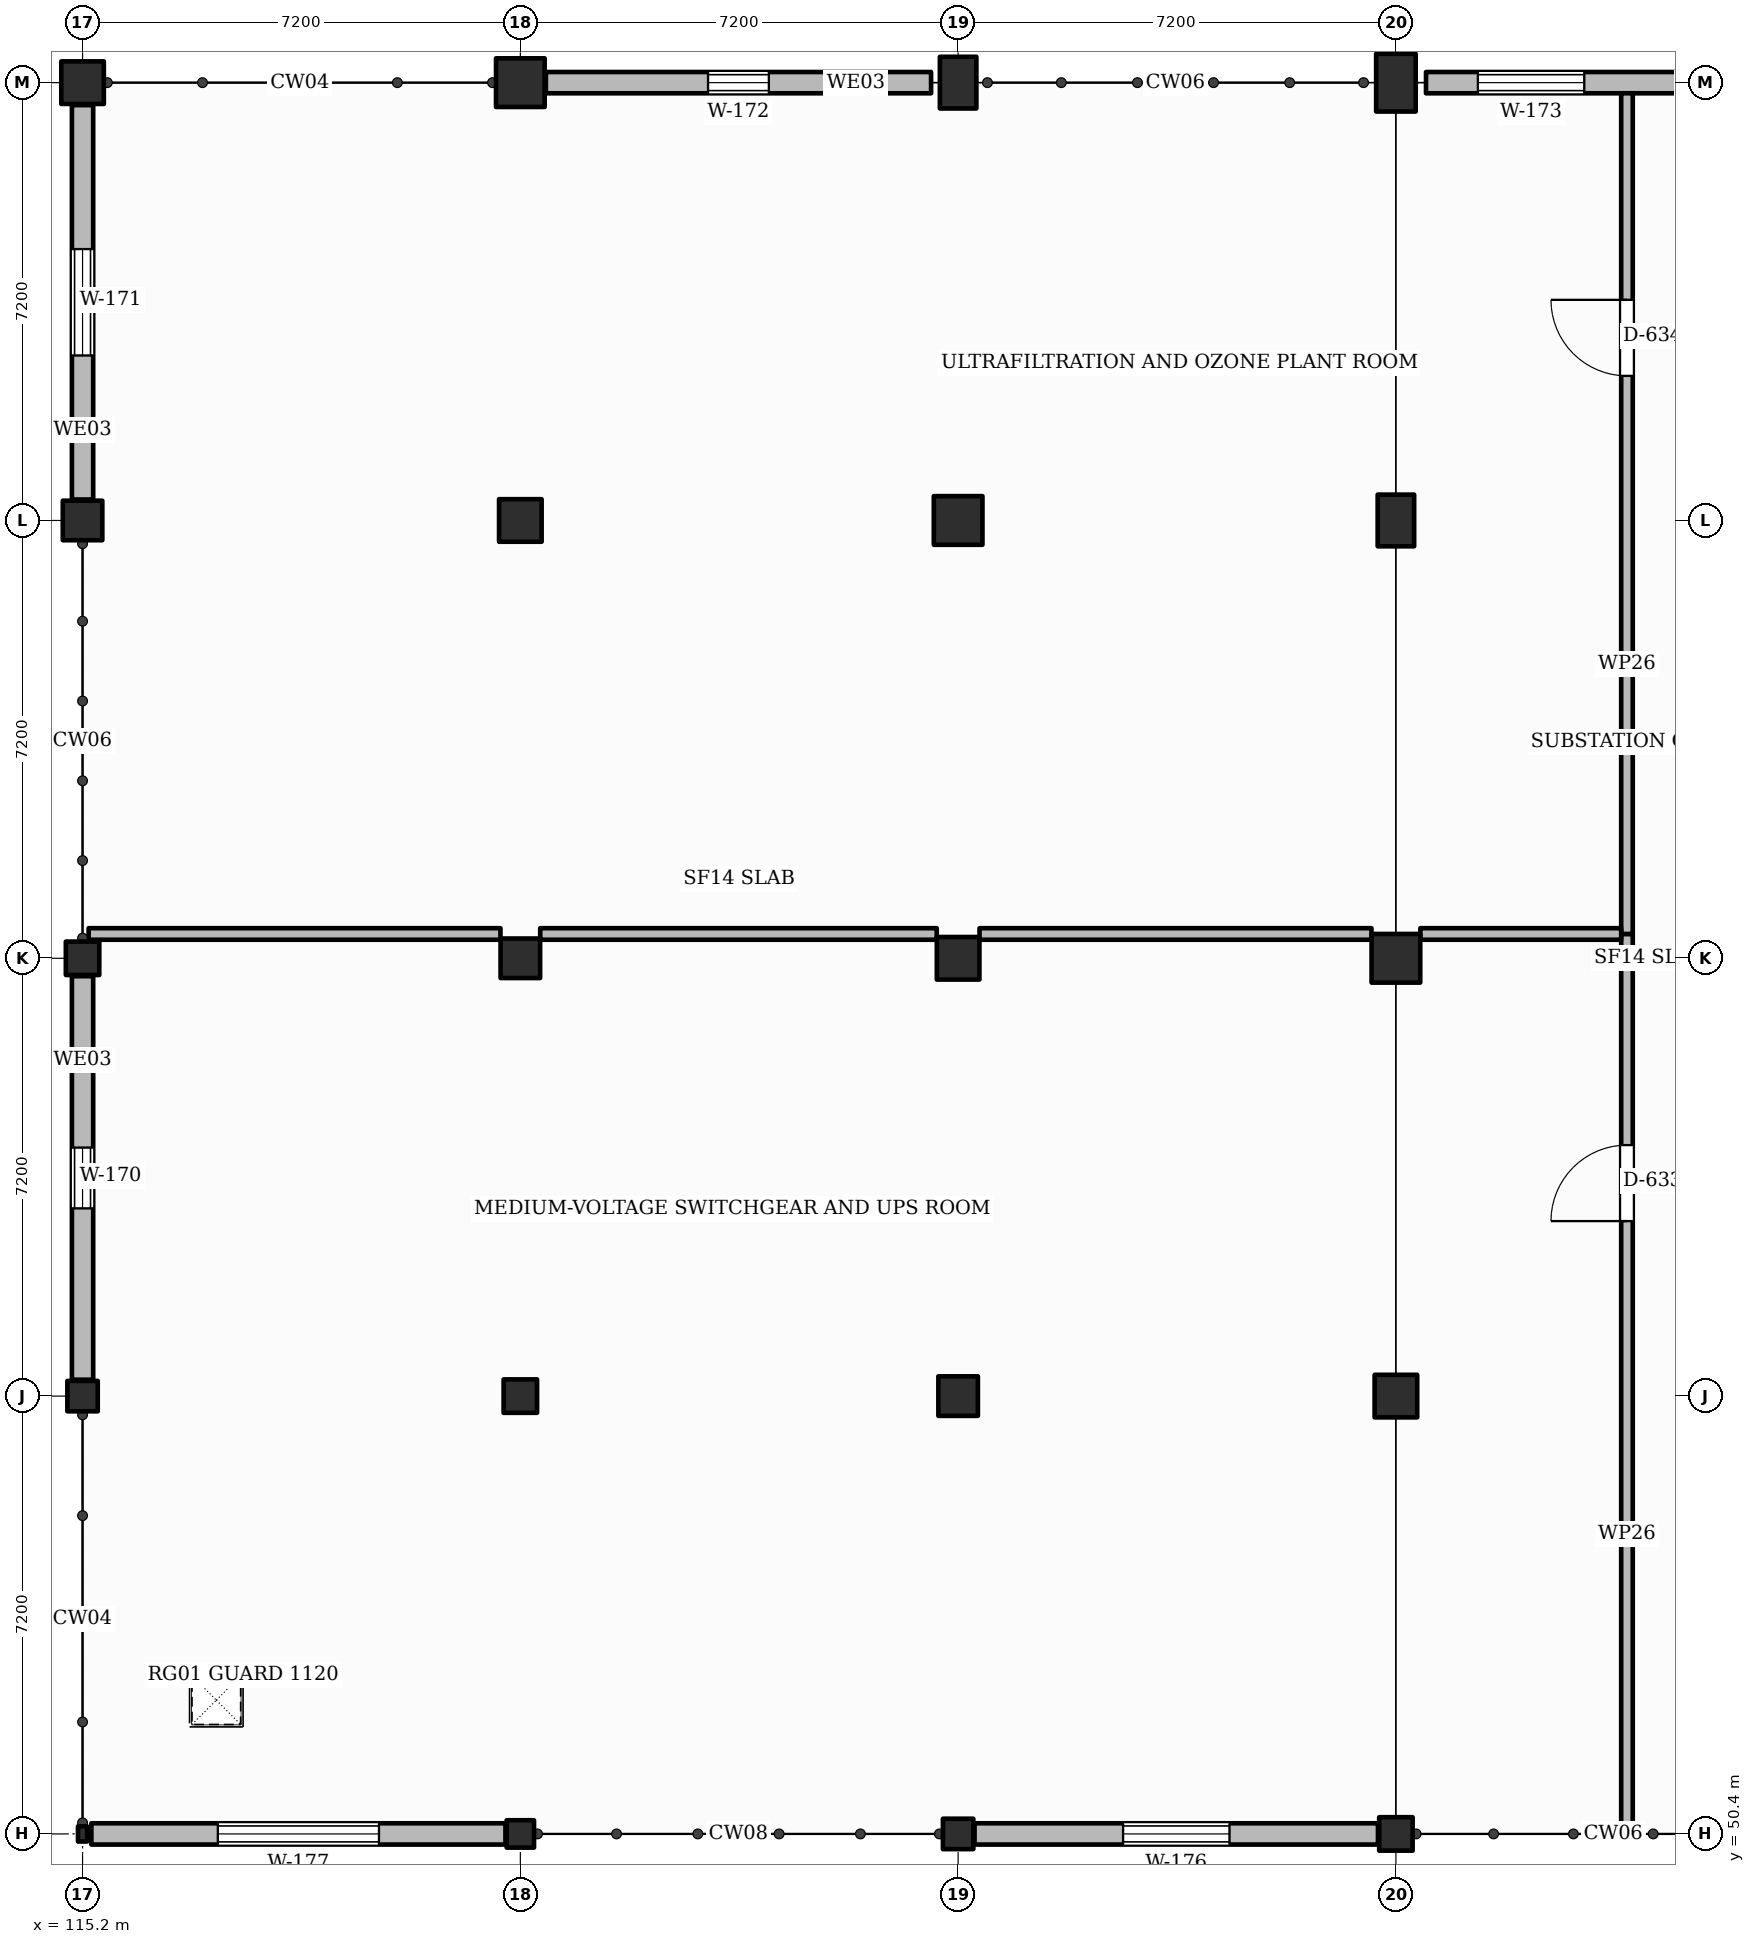
"""IFC4 building model, lengths in metres.
Left out: names, types, materials, properties, quantities, classifications, styles, units other than length and angle.
Written with IfcOpenShell. Run it as: python <this file> out.ifc"""

import sys

from ifc_helpers import new_model, si_unit, direction, frame, frame_2d, origin, origin_2d, place, context, subcontext, project, spatial, rectangle, hollow_rectangle, extrude, element, fill, save


model = new_model("IFC4")
c1 = context("Model", 3, precision=1e-05, world=origin(), true_north=direction((0.0, 1.0)))
c2 = subcontext(c1, "Body", "Model", "MODEL_VIEW")
j1 = project(units=[si_unit("LENGTHUNIT", "METRE"), si_unit("PLANEANGLEUNIT", "RADIAN")], contexts=[c1])
p1 = place(None, origin())
s1 = spatial("IfcSite", under=j1, at=p1, CompositionType="ELEMENT")
p2 = place(p1, origin())
s2 = spatial("IfcBuilding", under=s1, at=p2, CompositionType="ELEMENT")
p3 = place(p2, frame((0.0, 0.0, 5.4)))
s3 = spatial("IfcBuildingStorey", under=s2, at=p3, CompositionType="ELEMENT", Elevation=5.4)
p4 = place(p3, frame((115.2, 50.4, 0.0), z_axis=(0.0, 0.0, 1.0), x_axis=(1.0, 0.0, 0.0)))
e1 = element("IfcColumn", 1, at=p4, inside=s3, PredefinedType="COLUMN", context=c2, shape_type="SweptSolid", body=[
    extrude(hollow_rectangle(XDim=0.15, YDim=0.25, WallThickness=0.01, InnerFilletRadius=0.005, OuterFilletRadius=0.015, at=origin_2d()), origin(), (0.0, 0.0, 1.0), 4.5),
])
p5 = place(p3, frame((115.2, 57.6, 0.0), z_axis=(0.0, 0.0, 1.0), x_axis=(1.0, 0.0, 0.0)))
e2 = element("IfcColumn", 2, at=p5, inside=s3, PredefinedType="COLUMN", context=c2, shape_type="SweptSolid", body=[
    extrude(rectangle(XDim=0.5, YDim=0.5, at=origin_2d()), origin(), (0.0, 0.0, 1.0), 4.5),
])
p6 = place(p3, frame((115.2, 64.8, 0.0), z_axis=(0.0, 0.0, 1.0), x_axis=(1.0, 0.0, 0.0)))
e3 = element("IfcColumn", 3, at=p6, inside=s3, PredefinedType="COLUMN", context=c2, shape_type="SweptSolid", body=[
    extrude(rectangle(XDim=0.55, YDim=0.55, at=origin_2d()), origin(), (0.0, 0.0, 1.0), 4.5),
])
p7 = place(p3, frame((115.2, 72.0, 0.0), z_axis=(0.0, 0.0, 1.0), x_axis=(1.0, 0.0, 0.0)))
e4 = element("IfcColumn", 4, at=p7, inside=s3, PredefinedType="COLUMN", context=c2, shape_type="SweptSolid", body=[
    extrude(rectangle(XDim=0.65, YDim=0.65, at=origin_2d()), origin(), (0.0, 0.0, 1.0), 4.5),
])
p8 = place(p3, frame((115.2, 79.2, 0.0), z_axis=(0.0, 0.0, 1.0), x_axis=(1.0, 0.0, 0.0)))
e5 = element("IfcColumn", 5, at=p8, inside=s3, PredefinedType="COLUMN", context=c2, shape_type="SweptSolid", body=[
    extrude(rectangle(XDim=0.7, YDim=0.7, at=origin_2d()), origin(), (0.0, 0.0, 1.0), 4.5),
])
p9 = place(p3, frame((122.4, 50.4, 0.0), z_axis=(0.0, 0.0, 1.0), x_axis=(1.0, 0.0, 0.0)))
e6 = element("IfcColumn", 6, at=p9, inside=s3, PredefinedType="COLUMN", context=c2, shape_type="SweptSolid", body=[
    extrude(rectangle(XDim=0.45, YDim=0.45, at=origin_2d()), origin(), (0.0, 0.0, 1.0), 4.5),
])
p10 = place(p3, frame((122.4, 57.6, 0.0), z_axis=(0.0, 0.0, 1.0), x_axis=(1.0, 0.0, 0.0)))
e7 = element("IfcColumn", 7, at=p10, inside=s3, PredefinedType="COLUMN", context=c2, shape_type="SweptSolid", body=[
    extrude(rectangle(XDim=0.55, YDim=0.55, at=origin_2d()), origin(), (0.0, 0.0, 1.0), 4.5),
])
p11 = place(p3, frame((122.4, 64.8, 0.0), z_axis=(0.0, 0.0, 1.0), x_axis=(1.0, 0.0, 0.0)))
e8 = element("IfcColumn", 8, at=p11, inside=s3, PredefinedType="COLUMN", context=c2, shape_type="SweptSolid", body=[
    extrude(rectangle(XDim=0.65, YDim=0.65, at=origin_2d()), origin(), (0.0, 0.0, 1.0), 4.5),
])
p12 = place(p3, frame((122.4, 72.0, 0.0), z_axis=(0.0, 0.0, 1.0), x_axis=(1.0, 0.0, 0.0)))
e9 = element("IfcColumn", 9, at=p12, inside=s3, PredefinedType="COLUMN", context=c2, shape_type="SweptSolid", body=[
    extrude(rectangle(XDim=0.7, YDim=0.7, at=origin_2d()), origin(), (0.0, 0.0, 1.0), 4.5),
])
p13 = place(p3, frame((122.4, 79.2, 0.0), z_axis=(0.0, 0.0, 1.0), x_axis=(1.0, 0.0, 0.0)))
e10 = element("IfcColumn", 10, at=p13, inside=s3, PredefinedType="COLUMN", context=c2, shape_type="SweptSolid", body=[
    extrude(rectangle(XDim=0.8, YDim=0.8, at=origin_2d()), origin(), (0.0, 0.0, 1.0), 4.5),
])
p14 = place(p3, frame((129.6, 50.4, 0.0), z_axis=(0.0, 0.0, 1.0), x_axis=(1.0, 0.0, 0.0)))
e11 = element("IfcColumn", 11, at=p14, inside=s3, PredefinedType="COLUMN", context=c2, shape_type="SweptSolid", body=[
    extrude(rectangle(XDim=0.5, YDim=0.5, at=origin_2d()), origin(), (0.0, 0.0, 1.0), 4.5),
])
p15 = place(p3, frame((129.6, 57.6, 0.0), z_axis=(0.0, 0.0, 1.0), x_axis=(1.0, 0.0, 0.0)))
e12 = element("IfcColumn", 12, at=p15, inside=s3, PredefinedType="COLUMN", context=c2, shape_type="SweptSolid", body=[
    extrude(rectangle(XDim=0.65, YDim=0.65, at=origin_2d()), origin(), (0.0, 0.0, 1.0), 4.5),
])
p16 = place(p3, frame((129.6, 64.8, 0.0), z_axis=(0.0, 0.0, 1.0), x_axis=(1.0, 0.0, 0.0)))
e13 = element("IfcColumn", 13, at=p16, inside=s3, PredefinedType="COLUMN", context=c2, shape_type="SweptSolid", body=[
    extrude(rectangle(XDim=0.7, YDim=0.7, at=origin_2d()), origin(), (0.0, 0.0, 1.0), 4.5),
])
p17 = place(p3, frame((129.6, 72.0, 0.0), z_axis=(0.0, 0.0, 1.0), x_axis=(1.0, 0.0, 0.0)))
e14 = element("IfcColumn", 14, at=p17, inside=s3, PredefinedType="COLUMN", context=c2, shape_type="SweptSolid", body=[
    extrude(rectangle(XDim=0.8, YDim=0.8, at=origin_2d()), origin(), (0.0, 0.0, 1.0), 4.5),
])
p18 = place(p3, frame((129.6, 79.2, 0.0), z_axis=(0.0, 0.0, 1.0), x_axis=(1.0, 0.0, 0.0)))
e15 = element("IfcColumn", 15, at=p18, inside=s3, PredefinedType="COLUMN", context=c2, shape_type="SweptSolid", body=[
    extrude(rectangle(XDim=0.6, YDim=0.85, at=origin_2d()), origin(), (0.0, 0.0, 1.0), 4.5),
])
p19 = place(p3, frame((136.8, 50.4, 0.0), z_axis=(0.0, 0.0, 1.0), x_axis=(1.0, 0.0, 0.0)))
e16 = element("IfcColumn", 16, at=p19, inside=s3, PredefinedType="COLUMN", context=c2, shape_type="SweptSolid", body=[
    extrude(rectangle(XDim=0.55, YDim=0.55, at=origin_2d()), origin(), (0.0, 0.0, 1.0), 4.5),
])
p20 = place(p3, frame((136.8, 57.6, 0.0), z_axis=(0.0, 0.0, 1.0), x_axis=(1.0, 0.0, 0.0)))
e17 = element("IfcColumn", 17, at=p20, inside=s3, PredefinedType="COLUMN", context=c2, shape_type="SweptSolid", body=[
    extrude(rectangle(XDim=0.7, YDim=0.7, at=origin_2d()), origin(), (0.0, 0.0, 1.0), 4.5),
])
p21 = place(p3, frame((136.8, 64.8, 0.0), z_axis=(0.0, 0.0, 1.0), x_axis=(1.0, 0.0, 0.0)))
e18 = element("IfcColumn", 18, at=p21, inside=s3, PredefinedType="COLUMN", context=c2, shape_type="SweptSolid", body=[
    extrude(rectangle(XDim=0.8, YDim=0.8, at=origin_2d()), origin(), (0.0, 0.0, 1.0), 4.5),
])
p22 = place(p3, frame((136.8, 72.0, 0.0), z_axis=(0.0, 0.0, 1.0), x_axis=(1.0, 0.0, 0.0)))
e19 = element("IfcColumn", 19, at=p22, inside=s3, PredefinedType="COLUMN", context=c2, shape_type="SweptSolid", body=[
    extrude(rectangle(XDim=0.6, YDim=0.85, at=origin_2d()), origin(), (0.0, 0.0, 1.0), 4.5),
])
p23 = place(p3, frame((136.8, 79.2, 0.0), z_axis=(0.0, 0.0, 1.0), x_axis=(1.0, 0.0, 0.0)))
e20 = element("IfcColumn", 20, at=p23, inside=s3, PredefinedType="COLUMN", context=c2, shape_type="SweptSolid", body=[
    extrude(rectangle(XDim=0.65, YDim=0.95, at=origin_2d()), origin(), (0.0, 0.0, 1.0), 4.5),
])
p24 = place(p3, frame((115.2, 57.87, 0.0), z_axis=(0.0, 0.0, 1.0), x_axis=(0.0, 1.0, 0.0)))
e21 = element("IfcWall", 21, at=p24, inside=s3, PredefinedType="SOLIDWALL", context=c2, shape_type="SweptSolid", body=[
    extrude(rectangle(XDim=6.635, YDim=0.35, at=frame_2d((3.317, 0.0))), origin(), (0.0, 0.0, 1.0), 3.684),
])
p25 = place(p24, frame((2.817, 0.0, 1.05)))
e22 = element("IfcOpeningElement", 22, at=p25, cuts=e21, PredefinedType="OPENING", context=c2, shape_type="SweptSolid", body=[
    extrude(rectangle(XDim=1.0, YDim=1.6, at=frame_2d((0.5, 0.8))), frame((0.0, 0.185, 0.0), z_axis=(0.0, -1.0, 0.0), x_axis=(1.0, 0.0, 0.0)), (0.0, 0.0, 1.0), 0.37),
])
p26 = place(p3, frame((115.2, 72.345, 0.0), z_axis=(0.0, 0.0, 1.0), x_axis=(0.0, 1.0, 0.0)))
e23 = element("IfcWall", 23, at=p26, inside=s3, PredefinedType="SOLIDWALL", context=c2, shape_type="SweptSolid", body=[
    extrude(rectangle(XDim=6.485, YDim=0.35, at=frame_2d((3.243, 0.0))), origin(), (0.0, 0.0, 1.0), 3.75),
])
p27 = place(p26, frame((2.368, 0.0, 1.05)))
e24 = element("IfcOpeningElement", 24, at=p27, cuts=e23, PredefinedType="OPENING", context=c2, shape_type="SweptSolid", body=[
    extrude(rectangle(XDim=1.75, YDim=1.85, at=frame_2d((0.875, 0.925))), frame((0.0, 0.185, 0.0), z_axis=(0.0, -1.0, 0.0), x_axis=(1.0, 0.0, 0.0)), (0.0, 0.0, 1.0), 0.37),
])
p28 = place(p3, frame((122.82, 79.2, 0.0), z_axis=(0.0, 0.0, 1.0), x_axis=(1.0, 0.0, 0.0)))
e25 = element("IfcWall", 25, at=p28, inside=s3, PredefinedType="SOLIDWALL", context=c2, shape_type="SweptSolid", body=[
    extrude(rectangle(XDim=6.335, YDim=0.35, at=frame_2d((3.167, 0.0))), origin(), (0.0, 0.0, 1.0), 3.75),
])
p29 = place(p28, frame((2.667, 0.0, 1.05)))
e26 = element("IfcOpeningElement", 26, at=p29, cuts=e25, PredefinedType="OPENING", context=c2, shape_type="SweptSolid", body=[
    extrude(rectangle(XDim=1.0, YDim=1.6, at=frame_2d((0.5, 0.8))), frame((0.0, 0.185, 0.0), z_axis=(0.0, -1.0, 0.0), x_axis=(1.0, 0.0, 0.0)), (0.0, 0.0, 1.0), 0.37),
])
p30 = place(p3, frame((137.295, 79.2, 0.0), z_axis=(0.0, 0.0, 1.0), x_axis=(1.0, 0.0, 0.0)))
e27 = element("IfcWall", 27, at=p30, inside=s3, PredefinedType="SOLIDWALL", context=c2, shape_type="SweptSolid", body=[
    extrude(rectangle(XDim=6.547, YDim=0.35, at=frame_2d((3.273, 0.0))), origin(), (0.0, 0.0, 1.0), 3.75),
])
p31 = place(p30, frame((0.853, 0.0, 1.05)))
e28 = element("IfcOpeningElement", 28, at=p31, cuts=e27, PredefinedType="OPENING", context=c2, shape_type="SweptSolid", body=[
    extrude(rectangle(XDim=1.75, YDim=1.85, at=frame_2d((0.875, 0.925))), frame((0.0, 0.185, 0.0), z_axis=(0.0, -1.0, 0.0), x_axis=(1.0, 0.0, 0.0)), (0.0, 0.0, 1.0), 0.37),
])
p32 = place(p3, frame((136.505, 50.4, 0.0), z_axis=(0.0, 0.0, 1.0), x_axis=(-1.0, 0.0, 0.0)))
e29 = element("IfcWall", 29, at=p32, inside=s3, PredefinedType="SOLIDWALL", context=c2, shape_type="SweptSolid", body=[
    extrude(rectangle(XDim=6.635, YDim=0.35, at=frame_2d((3.317, 0.0))), origin(), (0.0, 0.0, 1.0), 3.37),
])
p33 = place(p32, frame((2.442, 0.0, 1.05)))
e30 = element("IfcOpeningElement", 30, at=p33, cuts=e29, PredefinedType="OPENING", context=c2, shape_type="SweptSolid", body=[
    extrude(rectangle(XDim=1.75, YDim=1.85, at=frame_2d((0.875, 0.925))), frame((0.0, 0.185, 0.0), z_axis=(0.0, -1.0, 0.0), x_axis=(1.0, 0.0, 0.0)), (0.0, 0.0, 1.0), 0.37),
])
p34 = place(p3, frame((122.155, 50.4, 0.0), z_axis=(0.0, 0.0, 1.0), x_axis=(-1.0, 0.0, 0.0)))
e31 = element("IfcWall", 31, at=p34, inside=s3, PredefinedType="SOLIDWALL", context=c2, shape_type="SweptSolid", body=[
    extrude(rectangle(XDim=6.81, YDim=0.35, at=frame_2d((3.405, 0.0))), origin(), (0.0, 0.0, 1.0), 3.37),
])
p35 = place(p34, frame((2.08, 0.0, 1.05)))
e32 = element("IfcOpeningElement", 32, at=p35, cuts=e31, PredefinedType="OPENING", context=c2, shape_type="SweptSolid", body=[
    extrude(rectangle(XDim=2.65, YDim=1.6, at=frame_2d((1.325, 0.8))), frame((0.0, 0.185, 0.0), z_axis=(0.0, -1.0, 0.0), x_axis=(1.0, 0.0, 0.0)), (0.0, 0.0, 1.0), 0.37),
])
p36 = place(p3, frame((140.6, 50.5, 0.0), z_axis=(0.0, 0.0, 1.0), x_axis=(0.0, 1.0, 0.0)))
e33 = element("IfcWall", 33, at=p36, inside=s3, PredefinedType="PARTITIONING", context=c2, shape_type="SweptSolid", body=[
    extrude(rectangle(XDim=14.7, YDim=0.19, at=frame_2d((7.35, 0.0))), origin(), (0.0, 0.0, 1.0), 3.55),
])
p37 = place(p36, frame((9.978, 0.0, 0.0)))
e34 = element("IfcOpeningElement", 34, at=p37, cuts=e33, PredefinedType="OPENING", context=c2, shape_type="SweptSolid", body=[
    extrude(rectangle(XDim=1.25, YDim=2.15, at=frame_2d((0.625, 1.075))), frame((0.0, 0.105, 0.0), z_axis=(0.0, -1.0, 0.0), x_axis=(1.0, 0.0, 0.0)), (0.0, 0.0, 1.0), 0.21),
])
p38 = place(p3, frame((140.6, 65.2, 0.0), z_axis=(0.0, 0.0, 1.0), x_axis=(0.0, 1.0, 0.0)))
e35 = element("IfcWall", 35, at=p38, inside=s3, PredefinedType="PARTITIONING", context=c2, shape_type="SweptSolid", body=[
    extrude(rectangle(XDim=13.825, YDim=0.19, at=frame_2d((6.913, 0.0))), origin(), (0.0, 0.0, 1.0), 3.55),
])
p39 = place(p38, frame((9.178, 0.0, 0.0)))
e36 = element("IfcOpeningElement", 36, at=p39, cuts=e35, PredefinedType="OPENING", context=c2, shape_type="SweptSolid", body=[
    extrude(rectangle(XDim=1.25, YDim=2.15, at=frame_2d((0.625, 1.075))), frame((0.0, 0.105, 0.0), z_axis=(0.0, -1.0, 0.0), x_axis=(1.0, 0.0, 0.0)), (0.0, 0.0, 1.0), 0.21),
])
p40 = place(p3, frame((115.3, 65.2, 0.0), z_axis=(0.0, 0.0, 1.0), x_axis=(1.0, 0.0, 0.0)))
e37 = element("IfcWall", 37, at=p40, inside=s3, PredefinedType="PARTITIONING", context=c2, shape_type="SweptSolid", body=[
    extrude(rectangle(XDim=6.773, YDim=0.19, at=frame_2d((3.386, 0.0))), origin(), (0.0, 0.0, 1.0), 3.55),
])
p41 = place(p3, frame((122.727, 65.2, 0.0), z_axis=(0.0, 0.0, 1.0), x_axis=(1.0, 0.0, 0.0)))
e38 = element("IfcWall", 38, at=p41, inside=s3, PredefinedType="PARTITIONING", context=c2, shape_type="SweptSolid", body=[
    extrude(rectangle(XDim=6.521, YDim=0.19, at=frame_2d((3.26, 0.0))), origin(), (0.0, 0.0, 1.0), 3.55),
])
p42 = place(p3, frame((129.952, 65.2, 0.0), z_axis=(0.0, 0.0, 1.0), x_axis=(1.0, 0.0, 0.0)))
e39 = element("IfcWall", 39, at=p42, inside=s3, PredefinedType="PARTITIONING", context=c2, shape_type="SweptSolid", body=[
    extrude(rectangle(XDim=6.446, YDim=0.19, at=frame_2d((3.223, 0.0))), origin(), (0.0, 0.0, 1.0), 3.55),
])
p43 = place(p3, frame((137.202, 65.2, 0.0), z_axis=(0.0, 0.0, 1.0), x_axis=(1.0, 0.0, 0.0)))
e40 = element("IfcWall", 40, at=p43, inside=s3, PredefinedType="PARTITIONING", context=c2, shape_type="SweptSolid", body=[
    extrude(rectangle(XDim=3.303, YDim=0.19, at=frame_2d((1.651, 0.0))), origin(), (0.0, 0.0, 1.0), 3.55),
])
p44 = place(p25, origin())
e41 = element("IfcWindow", 41, at=p44, inside=s3, PartitioningType="SINGLE_PANEL", PredefinedType="WINDOW", context=c2, shape_type="SweptSolid", body=[
    extrude(rectangle(XDim=1.0, YDim=1.6, at=frame_2d((0.5, 0.8))), frame((0.0, 0.03, 0.0), z_axis=(0.0, -1.0, 0.0), x_axis=(1.0, 0.0, 0.0)), (0.0, 0.0, 1.0), 0.06),
])
fill(e22, e41)
p45 = place(p27, origin())
e42 = element("IfcWindow", 42, at=p45, inside=s3, PartitioningType="SINGLE_PANEL", PredefinedType="WINDOW", context=c2, shape_type="SweptSolid", body=[
    extrude(rectangle(XDim=1.75, YDim=1.85, at=frame_2d((0.875, 0.925))), frame((0.0, 0.03, 0.0), z_axis=(0.0, -1.0, 0.0), x_axis=(1.0, 0.0, 0.0)), (0.0, 0.0, 1.0), 0.06),
])
fill(e24, e42)
p46 = place(p29, origin())
e43 = element("IfcWindow", 43, at=p46, inside=s3, PartitioningType="SINGLE_PANEL", PredefinedType="WINDOW", context=c2, shape_type="SweptSolid", body=[
    extrude(rectangle(XDim=1.0, YDim=1.6, at=frame_2d((0.5, 0.8))), frame((0.0, 0.03, 0.0), z_axis=(0.0, -1.0, 0.0), x_axis=(1.0, 0.0, 0.0)), (0.0, 0.0, 1.0), 0.06),
])
fill(e26, e43)
p47 = place(p31, origin())
e44 = element("IfcWindow", 44, at=p47, inside=s3, PartitioningType="SINGLE_PANEL", PredefinedType="WINDOW", context=c2, shape_type="SweptSolid", body=[
    extrude(rectangle(XDim=1.75, YDim=1.85, at=frame_2d((0.875, 0.925))), frame((0.0, 0.03, 0.0), z_axis=(0.0, -1.0, 0.0), x_axis=(1.0, 0.0, 0.0)), (0.0, 0.0, 1.0), 0.06),
])
fill(e28, e44)
p48 = place(p33, origin())
e45 = element("IfcWindow", 45, at=p48, inside=s3, PartitioningType="SINGLE_PANEL", PredefinedType="WINDOW", context=c2, shape_type="SweptSolid", body=[
    extrude(rectangle(XDim=1.75, YDim=1.85, at=frame_2d((0.875, 0.925))), frame((0.0, 0.03, 0.0), z_axis=(0.0, -1.0, 0.0), x_axis=(1.0, 0.0, 0.0)), (0.0, 0.0, 1.0), 0.06),
])
fill(e30, e45)
p49 = place(p35, origin())
e46 = element("IfcWindow", 46, at=p49, inside=s3, PartitioningType="SINGLE_PANEL", PredefinedType="WINDOW", context=c2, shape_type="SweptSolid", body=[
    extrude(rectangle(XDim=2.65, YDim=1.6, at=frame_2d((1.325, 0.8))), frame((0.0, 0.03, 0.0), z_axis=(0.0, -1.0, 0.0), x_axis=(1.0, 0.0, 0.0)), (0.0, 0.0, 1.0), 0.06),
])
fill(e32, e46)
p50 = place(p37, origin())
e47 = element("IfcDoor", 47, at=p50, inside=s3, OperationType="SINGLE_SWING_LEFT", PredefinedType="DOOR", context=c2, shape_type="SweptSolid", body=[
    extrude(rectangle(XDim=1.25, YDim=2.15, at=frame_2d((0.625, 1.075))), frame((0.0, 0.025, 0.0), z_axis=(0.0, -1.0, 0.0), x_axis=(1.0, 0.0, 0.0)), (0.0, 0.0, 1.0), 0.05),
])
fill(e34, e47)
p51 = place(p39, origin())
e48 = element("IfcDoor", 48, at=p51, inside=s3, OperationType="SINGLE_SWING_RIGHT", PredefinedType="DOOR", context=c2, shape_type="SweptSolid", body=[
    extrude(rectangle(XDim=1.25, YDim=2.15, at=frame_2d((0.625, 1.075))), frame((0.0, 0.025, 0.0), z_axis=(0.0, -1.0, 0.0), x_axis=(1.0, 0.0, 0.0)), (0.0, 0.0, 1.0), 0.05),
])
fill(e36, e48)
save(model, sys.argv[1])
